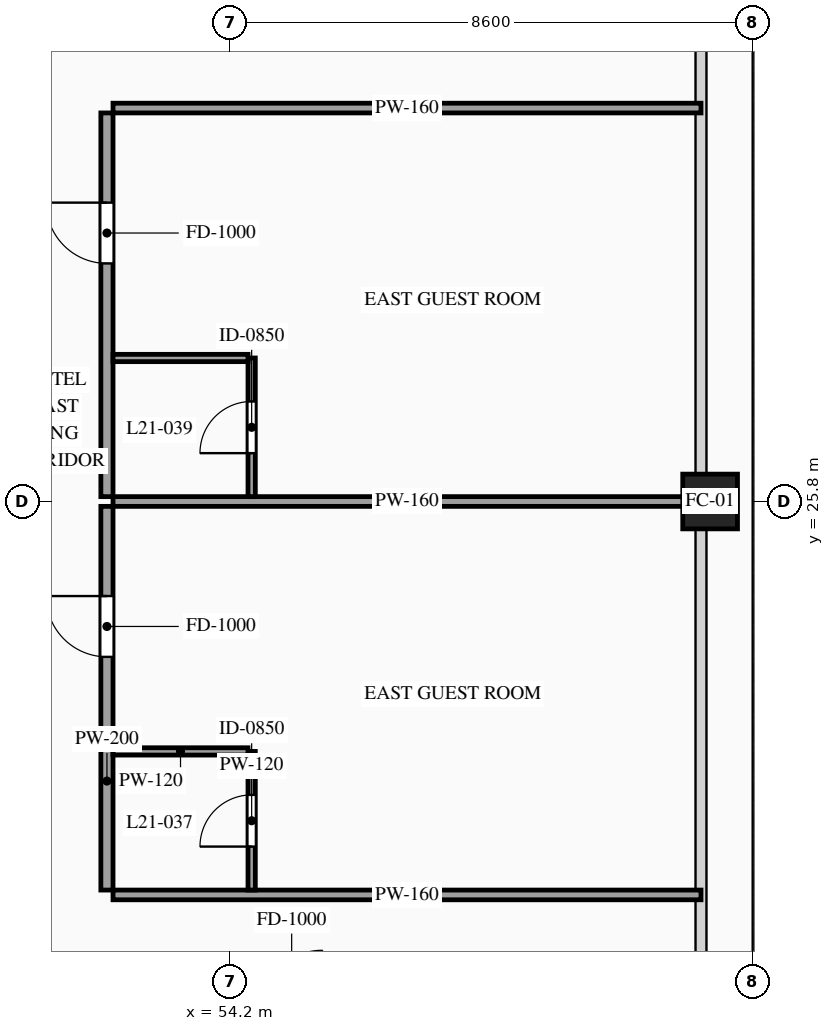
"""IFC4 building model, lengths in metres.
Left out: names, types, materials, properties, quantities, classifications, styles, units other than length and angle.
Written with IfcOpenShell. Run it as: python <this file> out.ifc"""

import sys

from ifc_helpers import new_model, si_unit, direction, frame, frame_2d, origin, origin_2d, place, context, subcontext, project, spatial, rectangle, hollow_rectangle, extrude, source, transform, mapped, element, fill, save


model = new_model("IFC4")
c1 = context("Model", 3, precision=1e-05, world=origin(), true_north=direction((0.0, 1.0)))
c2 = subcontext(c1, "Body", "Model", "MODEL_VIEW")
j1 = project(units=[si_unit("LENGTHUNIT", "METRE"), si_unit("PLANEANGLEUNIT", "RADIAN")], contexts=[c1])
p1 = place(None, origin())
s1 = spatial("IfcSite", under=j1, at=p1, CompositionType="ELEMENT")
p2 = place(p1, origin())
s2 = spatial("IfcBuilding", under=s1, at=p2, CompositionType="ELEMENT")
p3 = place(p2, frame((0.0, 0.0, 82.0)))
s3 = spatial("IfcBuildingStorey", under=s2, at=p3, CompositionType="ELEMENT", Elevation=82.0)
m1 = source(origin(), c2, "Body", "SweptSolid", [
    extrude(hollow_rectangle(XDim=0.9, YDim=0.9, WallThickness=0.042, at=origin_2d()), origin(), (0.0, 0.0, 1.0), 3.32),
])
p4 = place(p3, frame((62.1, 25.8, 0.0), z_axis=(0.0, 0.0, 1.0), x_axis=(1.0, 0.0, 0.0)))
e1 = element("IfcColumn", 1, at=p4, inside=s3, PredefinedType="COLUMN", context=c2, shape_type="MappedRepresentation", body=[
    mapped(m1, transform((0.0, 0.0, 0.0), scale=1.0)),
])
p5 = place(p3, frame((52.18, 19.41, 0.0), z_axis=(0.0, 0.0, 1.0), x_axis=(0.0, 1.0, 0.0)))
e2 = element("IfcWall", 2, at=p5, inside=s3, PredefinedType="PARTITIONING", context=c2, shape_type="SweptSolid", body=[
    extrude(rectangle(XDim=6.31, YDim=0.2, at=frame_2d((3.155, 0.0))), origin(), (0.0, 0.0, 1.0), 3.32),
])
p6 = place(p5, frame((3.835, 0.0, 0.0)))
e3 = element("IfcOpeningElement", 3, at=p6, cuts=e2, PredefinedType="OPENING", context=c2, shape_type="SweptSolid", body=[
    extrude(rectangle(XDim=1.0, YDim=2.2, at=frame_2d((0.5, 1.1))), frame((0.0, 0.115, 0.0), z_axis=(0.0, -1.0, 0.0), x_axis=(1.0, 0.0, 0.0)), (0.0, 0.0, 1.0), 0.23),
])
m2 = source(origin(), c2, "Body", "SweptSolid", [
    extrude(rectangle(XDim=9.67, YDim=0.16, at=frame_2d((4.835, 0.0))), origin(), (0.0, 0.0, 1.0), 1.715),
])
p7 = place(p3, frame((52.28, 25.8, 0.0), z_axis=(0.0, 0.0, 1.0), x_axis=(1.0, 0.0, 0.0)))
e4 = element("IfcWall", 4, at=p7, inside=s3, PredefinedType="PARTITIONING", context=c2, shape_type="MappedRepresentation", body=[
    mapped(m2, transform((0.0, 0.0, 0.0), scale=1.0)),
])
m3 = source(origin(), c2, "Body", "SweptSolid", [
    extrude(rectangle(XDim=9.67, YDim=0.16, at=frame_2d((4.835, 0.0))), origin(), (0.0, 0.0, 1.0), 3.32),
])
p8 = place(p3, frame((52.28, 19.33, 0.0), z_axis=(0.0, 0.0, 1.0), x_axis=(1.0, 0.0, 0.0)))
e5 = element("IfcWall", 5, at=p8, inside=s3, PredefinedType="PARTITIONING", context=c2, shape_type="MappedRepresentation", body=[
    mapped(m3, transform((0.0, 0.0, 0.0), scale=1.0)),
])
p9 = place(p3, frame((54.56, 19.41, 0.0), z_axis=(0.0, 0.0, 1.0), x_axis=(0.0, 1.0, 0.0)))
e6 = element("IfcWall", 6, at=p9, inside=s3, PredefinedType="PARTITIONING", context=c2, shape_type="SweptSolid", body=[
    extrude(rectangle(XDim=2.28, YDim=0.12, at=frame_2d((1.14, 0.0))), origin(), (0.0, 0.0, 1.0), 3.32),
])
p10 = place(p9, frame((0.715, 0.0, 0.0)))
e7 = element("IfcOpeningElement", 7, at=p10, cuts=e6, PredefinedType="OPENING", context=c2, shape_type="SweptSolid", body=[
    extrude(rectangle(XDim=0.85, YDim=2.1, at=frame_2d((0.425, 1.05))), frame((0.0, 0.075, 0.0), z_axis=(0.0, -1.0, 0.0), x_axis=(1.0, 0.0, 0.0)), (0.0, 0.0, 1.0), 0.15),
])
m4 = source(origin(), c2, "Body", "SweptSolid", [
    extrude(rectangle(XDim=2.22, YDim=0.12, at=frame_2d((1.11, 0.0))), origin(), (0.0, 0.0, 1.0), 3.32),
])
p11 = place(p3, frame((52.28, 21.69, 0.0), z_axis=(0.0, 0.0, 1.0), x_axis=(1.0, 0.0, 0.0)))
e8 = element("IfcWall", 8, at=p11, inside=s3, PredefinedType="PARTITIONING", context=c2, shape_type="MappedRepresentation", body=[
    mapped(m4, transform((0.0, 0.0, 0.0), scale=1.0)),
])
p12 = place(p3, frame((52.18, 25.88, 0.0), z_axis=(0.0, 0.0, 1.0), x_axis=(0.0, 1.0, 0.0)))
e9 = element("IfcWall", 9, at=p12, inside=s3, PredefinedType="PARTITIONING", context=c2, shape_type="SweptSolid", body=[
    extrude(rectangle(XDim=6.31, YDim=0.2, at=frame_2d((3.155, 0.0))), origin(), (0.0, 0.0, 1.0), 3.32),
])
p13 = place(p12, frame((3.835, 0.0, 0.0)))
e10 = element("IfcOpeningElement", 10, at=p13, cuts=e9, PredefinedType="OPENING", context=c2, shape_type="SweptSolid", body=[
    extrude(rectangle(XDim=1.0, YDim=2.2, at=frame_2d((0.5, 1.1))), frame((0.0, 0.115, 0.0), z_axis=(0.0, -1.0, 0.0), x_axis=(1.0, 0.0, 0.0)), (0.0, 0.0, 1.0), 0.23),
])
p14 = place(p3, frame((52.28, 32.27, 0.0), z_axis=(0.0, 0.0, 1.0), x_axis=(1.0, 0.0, 0.0)))
e11 = element("IfcWall", 11, at=p14, inside=s3, PredefinedType="PARTITIONING", context=c2, shape_type="MappedRepresentation", body=[
    mapped(m3, transform((0.0, 0.0, 0.0), scale=1.0)),
])
p15 = place(p3, frame((54.56, 25.88, 0.0), z_axis=(0.0, 0.0, 1.0), x_axis=(0.0, 1.0, 0.0)))
e12 = element("IfcWall", 12, at=p15, inside=s3, PredefinedType="PARTITIONING", context=c2, shape_type="SweptSolid", body=[
    extrude(rectangle(XDim=2.28, YDim=0.12, at=frame_2d((1.14, 0.0))), origin(), (0.0, 0.0, 1.0), 3.32),
])
p16 = place(p15, frame((0.715, 0.0, 0.0)))
e13 = element("IfcOpeningElement", 13, at=p16, cuts=e12, PredefinedType="OPENING", context=c2, shape_type="SweptSolid", body=[
    extrude(rectangle(XDim=0.85, YDim=2.1, at=frame_2d((0.425, 1.05))), frame((0.0, 0.075, 0.0), z_axis=(0.0, -1.0, 0.0), x_axis=(1.0, 0.0, 0.0)), (0.0, 0.0, 1.0), 0.15),
])
p17 = place(p3, frame((52.28, 28.16, 0.0), z_axis=(0.0, 0.0, 1.0), x_axis=(1.0, 0.0, 0.0)))
e14 = element("IfcWall", 14, at=p17, inside=s3, PredefinedType="PARTITIONING", context=c2, shape_type="MappedRepresentation", body=[
    mapped(m4, transform((0.0, 0.0, 0.0), scale=1.0)),
])
m5 = source(origin(), c2, "Body", "SweptSolid", [
    extrude(rectangle(XDim=1.0, YDim=2.2, at=frame_2d((0.5, 1.1))), frame((0.0, 0.025, 0.0), z_axis=(0.0, -1.0, 0.0), x_axis=(1.0, 0.0, 0.0)), (0.0, 0.0, 1.0), 0.05),
])
p18 = place(p6, origin())
e15 = element("IfcDoor", 15, at=p18, inside=s3, OperationType="SINGLE_SWING_RIGHT", PredefinedType="DOOR", context=c2, shape_type="MappedRepresentation", body=[
    mapped(m5, transform((0.0, 0.0, 0.0), scale=1.0)),
])
fill(e3, e15)
m6 = source(origin(), c2, "Body", "SweptSolid", [
    extrude(rectangle(XDim=0.85, YDim=2.1, at=frame_2d((0.425, 1.05))), frame((0.0, 0.025, 0.0), z_axis=(0.0, -1.0, 0.0), x_axis=(1.0, 0.0, 0.0)), (0.0, 0.0, 1.0), 0.05),
])
p19 = place(p10, origin())
e16 = element("IfcDoor", 16, at=p19, inside=s3, OperationType="SINGLE_SWING_LEFT", PredefinedType="DOOR", context=c2, shape_type="MappedRepresentation", body=[
    mapped(m6, transform((0.0, 0.0, 0.0), scale=1.0)),
])
fill(e7, e16)
p20 = place(p13, origin())
e17 = element("IfcDoor", 17, at=p20, inside=s3, OperationType="SINGLE_SWING_RIGHT", PredefinedType="DOOR", context=c2, shape_type="MappedRepresentation", body=[
    mapped(m5, transform((0.0, 0.0, 0.0), scale=1.0)),
])
fill(e10, e17)
p21 = place(p16, origin())
e18 = element("IfcDoor", 18, at=p21, inside=s3, OperationType="SINGLE_SWING_LEFT", PredefinedType="DOOR", context=c2, shape_type="MappedRepresentation", body=[
    mapped(m6, transform((0.0, 0.0, 0.0), scale=1.0)),
])
fill(e13, e18)
save(model, sys.argv[1])
